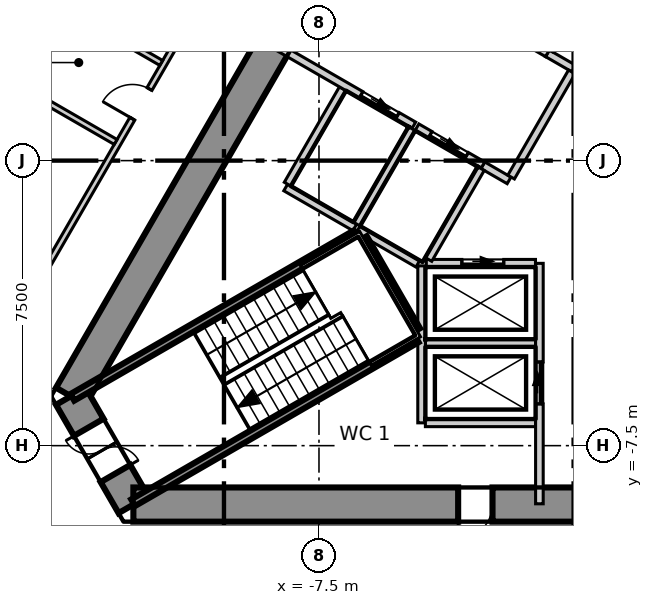
"""IFC4 building model, lengths in metres.
Left out: names, types, materials, properties, quantities, classifications, styles, units other than length and angle.
Written with IfcOpenShell. Run it as: python <this file> out.ifc"""

import sys

from ifc_helpers import new_model, si_unit, direction, frame, frame_2d, origin, place, context, subcontext, project, spatial, polyline, rectangle, outline, extrude, element, fill, save


model = new_model("IFC4")
c1 = context("Model", 3, precision=1e-05, world=origin(), true_north=direction((0.0, 1.0)))
c2 = subcontext(c1, "Body", "Model", "MODEL_VIEW")
j1 = project(units=[si_unit("LENGTHUNIT", "METRE"), si_unit("PLANEANGLEUNIT", "RADIAN")], contexts=[c1])
p1 = place(None, origin())
s1 = spatial("IfcSite", under=j1, at=p1, CompositionType="ELEMENT")
p2 = place(p1, origin())
s2 = spatial("IfcBuilding", under=s1, at=p2, CompositionType="ELEMENT")
p3 = place(p2, frame((0.0, 0.0, 71.3)))
s3 = spatial("IfcBuildingStorey", under=s2, at=p3, CompositionType="ELEMENT", Elevation=71.3)
p4 = place(p3, frame((-1.645, 15.25, -0.3), z_axis=(0.0, 0.0, 1.0), x_axis=(-0.500026485275, -0.866010111964, 0.0)))
e1 = element("IfcWall", 1, at=p4, inside=s3, PredefinedType="SHEAR", context=c2, shape_type="SweptSolid", body=[
    extrude(outline(polyline([(-0.26, -0.45), (1.685, -0.45), (3.63, -0.45), (5.576, -0.45), (7.521, -0.45), (9.466, -0.449), (11.411, -0.449), (13.357, -0.449), (15.302, -0.449), (17.247, -0.449), (19.192, -0.449), (21.138, -0.449), (23.083, -0.449), (25.028, -0.449), (24.509, 0.45), (22.644, 0.45), (20.778, 0.45), (18.913, 0.45), (17.048, 0.45), (15.182, 0.449), (13.317, 0.449), (11.452, 0.449), (9.587, 0.449), (7.721, 0.449), (5.856, 0.449), (3.991, 0.449), (2.125, 0.449), (0.26, 0.449), (-0.26, -0.45)])), origin(), (0.0, 0.0, 1.0), 4.0),
])
p5 = place(p4, frame((11.834, 0.0, 0.3)))
e2 = element("IfcOpeningElement", 2, at=p5, cuts=e1, PredefinedType="OPENING", context=c2, shape_type="SweptSolid", body=[
    extrude(rectangle(XDim=1.1, YDim=2.1, at=frame_2d((0.55, 1.05))), frame((0.0, 0.46, 0.0), z_axis=(0.0, -1.0, 0.0), x_axis=(1.0, 0.0, 0.0)), (0.0, 0.0, 1.0), 0.92),
])
p6 = place(p4, frame((8.13, 0.0, 0.3)))
e3 = element("IfcOpeningElement", 3, at=p6, cuts=e1, PredefinedType="OPENING", context=c2, shape_type="SweptSolid", body=[
    extrude(rectangle(XDim=0.9, YDim=2.1, at=frame_2d((0.45, 1.05))), frame((0.0, 0.46, 0.0), z_axis=(0.0, -1.0, 0.0), x_axis=(1.0, 0.0, 0.0)), (0.0, 0.0, 1.0), 0.92),
])
p7 = place(p4, frame((3.255, 0.0, 0.3)))
e4 = element("IfcOpeningElement", 4, at=p7, cuts=e1, PredefinedType="OPENING", context=c2, shape_type="SweptSolid", body=[
    extrude(rectangle(XDim=0.9, YDim=2.1, at=frame_2d((0.45, 1.05))), frame((0.0, 0.46, 0.0), z_axis=(0.0, -1.0, 0.0), x_axis=(1.0, 0.0, 0.0)), (0.0, 0.0, 1.0), 0.92),
])
p8 = place(p3, frame((-14.03, -6.2, -0.3), z_axis=(0.0, 0.0, 1.0), x_axis=(0.500111984565, -0.865960739811, 0.0)))
e5 = element("IfcWall", 5, at=p8, inside=s3, PredefinedType="SHEAR", context=c2, shape_type="SweptSolid", body=[
    extrude(outline(polyline([(-0.26, -0.449), (1.646, -0.449), (3.551, -0.45), (3.032, 0.45), (1.646, 0.45), (0.26, 0.45), (-0.26, -0.449)])), origin(), (0.0, 0.0, 1.0), 4.0),
])
p9 = place(p8, frame((0.946, 0.0, 0.3)))
e6 = element("IfcOpeningElement", 6, at=p9, cuts=e5, PredefinedType="OPENING", context=c2, shape_type="SweptSolid", body=[
    extrude(rectangle(XDim=1.4, YDim=2.1, at=frame_2d((0.7, 1.05))), frame((0.0, 0.46, 0.0), z_axis=(0.0, -1.0, 0.0), x_axis=(1.0, 0.0, 0.0)), (0.0, 0.0, 1.0), 0.92),
])
p10 = place(p3, frame((-12.384, -9.05, -0.3), z_axis=(0.0, 0.0, 1.0), x_axis=(1.0, 0.0, 0.0)))
e7 = element("IfcWall", 7, at=p10, inside=s3, PredefinedType="SHEAR", context=c2, shape_type="SweptSolid", body=[
    extrude(outline(polyline([(-0.26, -0.45), (1.685, -0.45), (3.63, -0.45), (5.576, -0.45), (7.521, -0.45), (9.466, -0.45), (11.411, -0.45), (13.357, -0.45), (15.302, -0.45), (17.247, -0.45), (19.192, -0.45), (21.138, -0.45), (23.083, -0.45), (25.028, -0.45), (24.508, 0.45), (22.643, 0.45), (20.778, 0.45), (18.912, 0.45), (17.047, 0.45), (15.182, 0.45), (13.317, 0.45), (11.451, 0.45), (9.586, 0.45), (7.721, 0.45), (5.856, 0.45), (3.99, 0.45), (2.125, 0.45), (0.26, 0.45), (-0.26, -0.45)])), origin(), (0.0, 0.0, 1.0), 4.0),
])
p11 = place(p10, frame((8.548, 0.0, 0.3)))
e8 = element("IfcOpeningElement", 8, at=p11, cuts=e7, PredefinedType="OPENING", context=c2, shape_type="SweptSolid", body=[
    extrude(rectangle(XDim=0.9, YDim=2.1, at=frame_2d((0.45, 1.05))), frame((0.0, 0.46, 0.0), z_axis=(0.0, -1.0, 0.0), x_axis=(1.0, 0.0, 0.0)), (0.0, 0.0, 1.0), 0.92),
])
p12 = place(p10, frame((19.788, 0.0, 0.3)))
e9 = element("IfcOpeningElement", 9, at=p12, cuts=e7, PredefinedType="OPENING", context=c2, shape_type="SweptSolid", body=[
    extrude(rectangle(XDim=1.0, YDim=2.1, at=frame_2d((0.5, 1.05))), frame((0.0, 0.46, 0.0), z_axis=(0.0, -1.0, 0.0), x_axis=(1.0, 0.0, 0.0)), (0.0, 0.0, 1.0), 0.92),
])
p13 = place(p3, frame((-3.326, 37.084, 0.0), z_axis=(0.0, 0.0, 1.0), x_axis=(-0.500000131003, -0.86602532815, 0.0)))
e10 = element("IfcWall", 10, at=p13, inside=s3, PredefinedType="ELEMENTEDWALL", context=c2, shape_type="SweptSolid", body=[
    extrude(rectangle(XDim=60.886, YDim=0.2, at=frame_2d((30.443, 0.0))), origin(), (0.0, 0.0, 1.0), 3.7),
])
p14 = place(p13, frame((2.146, 0.0, 0.9)))
e11 = element("IfcOpeningElement", 11, at=p14, cuts=e10, PredefinedType="OPENING", context=c2, shape_type="SweptSolid", body=[
    extrude(rectangle(XDim=5.6, YDim=2.5, at=frame_2d((2.8, 1.25))), frame((0.0, 0.11, 0.0), z_axis=(0.0, -1.0, 0.0), x_axis=(1.0, 0.0, 0.0)), (0.0, 0.0, 1.0), 0.22),
])
p15 = place(p13, frame((9.434, 0.0, 0.9)))
e12 = element("IfcOpeningElement", 12, at=p15, cuts=e10, PredefinedType="OPENING", context=c2, shape_type="SweptSolid", body=[
    extrude(rectangle(XDim=5.6, YDim=2.5, at=frame_2d((2.8, 1.25))), frame((0.0, 0.11, 0.0), z_axis=(0.0, -1.0, 0.0), x_axis=(1.0, 0.0, 0.0)), (0.0, 0.0, 1.0), 0.22),
])
p16 = place(p13, frame((16.721, 0.0, 0.9)))
e13 = element("IfcOpeningElement", 13, at=p16, cuts=e10, PredefinedType="OPENING", context=c2, shape_type="SweptSolid", body=[
    extrude(rectangle(XDim=5.6, YDim=2.5, at=frame_2d((2.8, 1.25))), frame((0.0, 0.11, 0.0), z_axis=(0.0, -1.0, 0.0), x_axis=(1.0, 0.0, 0.0)), (0.0, 0.0, 1.0), 0.22),
])
p17 = place(p13, frame((24.009, 0.0, 0.9)))
e14 = element("IfcOpeningElement", 14, at=p17, cuts=e10, PredefinedType="OPENING", context=c2, shape_type="SweptSolid", body=[
    extrude(rectangle(XDim=5.6, YDim=2.5, at=frame_2d((2.8, 1.25))), frame((0.0, 0.11, 0.0), z_axis=(0.0, -1.0, 0.0), x_axis=(1.0, 0.0, 0.0)), (0.0, 0.0, 1.0), 0.22),
])
p18 = place(p13, frame((31.297, 0.0, 0.9)))
e15 = element("IfcOpeningElement", 15, at=p18, cuts=e10, PredefinedType="OPENING", context=c2, shape_type="SweptSolid", body=[
    extrude(rectangle(XDim=5.6, YDim=2.5, at=frame_2d((2.8, 1.25))), frame((0.0, 0.11, 0.0), z_axis=(0.0, -1.0, 0.0), x_axis=(1.0, 0.0, 0.0)), (0.0, 0.0, 1.0), 0.22),
])
p19 = place(p13, frame((38.584, 0.0, 0.9)))
e16 = element("IfcOpeningElement", 16, at=p19, cuts=e10, PredefinedType="OPENING", context=c2, shape_type="SweptSolid", body=[
    extrude(rectangle(XDim=5.6, YDim=2.5, at=frame_2d((2.8, 1.25))), frame((0.0, 0.11, 0.0), z_axis=(0.0, -1.0, 0.0), x_axis=(1.0, 0.0, 0.0)), (0.0, 0.0, 1.0), 0.22),
])
p20 = place(p13, frame((45.872, 0.0, 0.9)))
e17 = element("IfcOpeningElement", 17, at=p20, cuts=e10, PredefinedType="OPENING", context=c2, shape_type="SweptSolid", body=[
    extrude(rectangle(XDim=5.6, YDim=2.5, at=frame_2d((2.8, 1.25))), frame((0.0, 0.11, 0.0), z_axis=(0.0, -1.0, 0.0), x_axis=(1.0, 0.0, 0.0)), (0.0, 0.0, 1.0), 0.22),
])
p21 = place(p13, frame((53.159, 0.0, 0.9)))
e18 = element("IfcOpeningElement", 18, at=p21, cuts=e10, PredefinedType="OPENING", context=c2, shape_type="SweptSolid", body=[
    extrude(rectangle(XDim=5.6, YDim=2.5, at=frame_2d((2.8, 1.25))), frame((0.0, 0.11, 0.0), z_axis=(0.0, -1.0, 0.0), x_axis=(1.0, 0.0, 0.0)), (0.0, 0.0, 1.0), 0.22),
])
p22 = place(p3, frame((-19.497, -11.17, 0.0), z_axis=(0.0, 0.0, 1.0), x_axis=(0.499998854553, 0.866026065108, 0.0)))
e19 = element("IfcWall", 19, at=p22, inside=s3, PredefinedType="PARTITIONING", context=c2, shape_type="SweptSolid", body=[
    extrude(rectangle(XDim=38.994, YDim=0.15, at=frame_2d((19.497, 0.0))), origin(), (0.0, 0.0, 1.0), 3.7),
])
p23 = place(p22, frame((35.944, 0.0, 0.0)))
e20 = element("IfcOpeningElement", 20, at=p23, cuts=e19, PredefinedType="OPENING", context=c2, shape_type="SweptSolid", body=[
    extrude(rectangle(XDim=1.1, YDim=2.1, at=frame_2d((0.55, 1.05))), frame((0.0, 0.085, 0.0), z_axis=(0.0, -1.0, 0.0), x_axis=(1.0, 0.0, 0.0)), (0.0, 0.0, 1.0), 0.17),
])
p24 = place(p22, frame((26.148, 0.0, 0.0)))
e21 = element("IfcOpeningElement", 21, at=p24, cuts=e19, PredefinedType="OPENING", context=c2, shape_type="SweptSolid", body=[
    extrude(rectangle(XDim=1.1, YDim=2.1, at=frame_2d((0.55, 1.05))), frame((0.0, 0.085, 0.0), z_axis=(0.0, -1.0, 0.0), x_axis=(1.0, 0.0, 0.0)), (0.0, 0.0, 1.0), 0.17),
])
p25 = place(p22, frame((8.572, 0.0, 0.0)))
e22 = element("IfcOpeningElement", 22, at=p25, cuts=e19, PredefinedType="OPENING", context=c2, shape_type="SweptSolid", body=[
    extrude(rectangle(XDim=1.1, YDim=2.1, at=frame_2d((0.55, 1.05))), frame((0.0, 0.085, 0.0), z_axis=(0.0, -1.0, 0.0), x_axis=(1.0, 0.0, 0.0)), (0.0, 0.0, 1.0), 0.17),
])
p26 = place(p22, frame((17.172, 0.0, 0.0)))
e23 = element("IfcOpeningElement", 23, at=p26, cuts=e19, PredefinedType="OPENING", context=c2, shape_type="SweptSolid", body=[
    extrude(rectangle(XDim=0.9, YDim=2.1, at=frame_2d((0.45, 1.05))), frame((0.0, 0.085, 0.0), z_axis=(0.0, -1.0, 0.0), x_axis=(1.0, 0.0, 0.0)), (0.0, 0.0, 1.0), 0.17),
])
p27 = place(p22, frame((14.172, 0.0, 0.0)))
e24 = element("IfcOpeningElement", 24, at=p27, cuts=e19, PredefinedType="OPENING", context=c2, shape_type="SweptSolid", body=[
    extrude(rectangle(XDim=0.9, YDim=2.1, at=frame_2d((0.45, 1.05))), frame((0.0, 0.085, 0.0), z_axis=(0.0, -1.0, 0.0), x_axis=(1.0, 0.0, 0.0)), (0.0, 0.0, 1.0), 0.17),
])
p28 = place(p22, frame((1.797, 0.0, 0.0)))
e25 = element("IfcOpeningElement", 25, at=p28, cuts=e19, PredefinedType="OPENING", context=c2, shape_type="SweptSolid", body=[
    extrude(rectangle(XDim=1.1, YDim=2.1, at=frame_2d((0.55, 1.05))), frame((0.0, 0.085, 0.0), z_axis=(0.0, -1.0, 0.0), x_axis=(1.0, 0.0, 0.0)), (0.0, 0.0, 1.0), 0.17),
])
p29 = place(p3, frame((-14.812, 4.395, 0.0), z_axis=(0.0, 0.0, 1.0), x_axis=(0.866040790738, -0.499973348067, 0.0)))
e26 = element("IfcWall", 26, at=p29, inside=s3, PredefinedType="PARTITIONING", context=c2, shape_type="SweptSolid", body=[
    extrude(rectangle(XDim=3.65, YDim=0.15, at=frame_2d((1.825, 0.0))), origin(), (0.0, 0.0, 1.0), 3.7),
])
p30 = place(p3, frame((-15.384, 1.954, 0.0), z_axis=(0.0, 0.0, 1.0), x_axis=(0.499980071345, 0.866036909293, 0.0)))
e27 = element("IfcWall", 27, at=p30, inside=s3, PredefinedType="PARTITIONING", context=c2, shape_type="SweptSolid", body=[
    extrude(rectangle(XDim=2.324, YDim=0.15, at=frame_2d((1.162, 0.0))), origin(), (0.0, 0.0, 1.0), 3.7),
])
p31 = place(p3, frame((-15.319, 1.916, 0.0), z_axis=(0.0, 0.0, 1.0), x_axis=(0.866004402611, -0.500036373335, 0.0)))
e28 = element("IfcWall", 28, at=p31, inside=s3, PredefinedType="PARTITIONING", context=c2, shape_type="SweptSolid", body=[
    extrude(rectangle(XDim=2.85, YDim=0.15, at=frame_2d((1.425, 0.0))), origin(), (0.0, 0.0, 1.0), 3.7),
])
p32 = place(p3, frame((-8.376, -0.707, 0.0), z_axis=(0.0, 0.0, 1.0), x_axis=(0.866067520717, -0.499927044236, 0.0)))
e29 = element("IfcWall", 29, at=p32, inside=s3, PredefinedType="SOLIDWALL", context=c2, shape_type="SweptSolid", body=[
    extrude(rectangle(XDim=2.1, YDim=0.2, at=frame_2d((1.05, 0.0))), origin(), (0.0, 0.0, 1.0), 3.7),
])
p33 = place(p3, frame((-8.326, -0.62, 0.0), z_axis=(0.0, 0.0, 1.0), x_axis=(0.500023687443, 0.866011727401, 0.0)))
e30 = element("IfcWall", 30, at=p33, inside=s3, PredefinedType="SOLIDWALL", context=c2, shape_type="SweptSolid", body=[
    extrude(rectangle(XDim=2.9, YDim=0.2, at=frame_2d((1.45, 0.0))), origin(), (0.0, 0.0, 1.0), 3.7),
])
p34 = place(p3, frame((-4.7, -4.8, 0.0), z_axis=(0.0, 0.0, 1.0), x_axis=(1.0, 0.0, 0.0)))
e31 = element("IfcWall", 31, at=p34, inside=s3, PredefinedType="SOLIDWALL", context=c2, shape_type="SweptSolid", body=[
    extrude(rectangle(XDim=2.9, YDim=0.2, at=frame_2d((1.45, 0.0))), origin(), (0.0, 0.0, 1.0), 3.7),
])
p35 = place(p3, frame((-4.8, -6.9, 0.0), z_axis=(0.0, 0.0, 1.0), x_axis=(0.0, 1.0, 0.0)))
e32 = element("IfcWall", 32, at=p35, inside=s3, PredefinedType="SOLIDWALL", context=c2, shape_type="SweptSolid", body=[
    extrude(rectangle(XDim=4.131, YDim=0.2, at=frame_2d((2.065, 0.0))), origin(), (0.0, 0.0, 1.0), 3.7),
])
p36 = place(p3, frame((-4.7, -6.9, 0.0), z_axis=(0.0, 0.0, 1.0), x_axis=(1.0, 0.0, 0.0)))
e33 = element("IfcWall", 33, at=p36, inside=s3, PredefinedType="SOLIDWALL", context=c2, shape_type="SweptSolid", body=[
    extrude(rectangle(XDim=2.9, YDim=0.2, at=frame_2d((1.45, 0.0))), origin(), (0.0, 0.0, 1.0), 3.7),
])
p37 = place(p3, frame((-1.7, -9.03, 0.0), z_axis=(0.0, 0.0, 1.0), x_axis=(0.0, 1.0, 0.0)))
e34 = element("IfcWall", 34, at=p37, inside=s3, PredefinedType="SOLIDWALL", context=c2, shape_type="SweptSolid", body=[
    extrude(rectangle(XDim=6.327, YDim=0.2, at=frame_2d((3.164, 0.0))), origin(), (0.0, 0.0, 1.0), 3.7),
])
p38 = place(p37, frame((2.63, 0.0, 0.0)))
e35 = element("IfcOpeningElement", 35, at=p38, cuts=e34, PredefinedType="OPENING", context=c2, shape_type="SweptSolid", body=[
    extrude(rectangle(XDim=1.1, YDim=2.1, at=frame_2d((0.55, 1.05))), frame((0.0, 0.11, 0.0), z_axis=(0.0, -1.0, 0.0), x_axis=(1.0, 0.0, 0.0)), (0.0, 0.0, 1.0), 0.22),
])
p39 = place(p3, frame((-4.676, -2.7, 0.0), z_axis=(0.0, 0.0, 1.0), x_axis=(1.0, 0.0, 0.0)))
e36 = element("IfcWall", 36, at=p39, inside=s3, PredefinedType="SOLIDWALL", context=c2, shape_type="SweptSolid", body=[
    extrude(rectangle(XDim=2.873, YDim=0.2, at=frame_2d((1.437, 0.0))), origin(), (0.0, 0.0, 1.0), 3.7),
])
p40 = place(p39, frame((0.937, 0.0, 0.0)))
e37 = element("IfcOpeningElement", 37, at=p40, cuts=e36, PredefinedType="OPENING", context=c2, shape_type="SweptSolid", body=[
    extrude(rectangle(XDim=1.1, YDim=2.1, at=frame_2d((0.55, 1.05))), frame((0.0, 0.11, 0.0), z_axis=(0.0, -1.0, 0.0), x_axis=(1.0, 0.0, 0.0)), (0.0, 0.0, 1.0), 0.22),
])
p41 = place(p3, frame((-8.67, 3.043, 0.0), z_axis=(0.0, 0.0, 1.0), x_axis=(0.866029956157, -0.499992114976, 0.0)))
e38 = element("IfcWall", 38, at=p41, inside=s3, PredefinedType="SOLIDWALL", context=c2, shape_type="SweptSolid", body=[
    extrude(rectangle(XDim=4.232, YDim=0.2, at=frame_2d((2.116, 0.0))), origin(), (0.0, 0.0, 1.0), 3.7),
])
p42 = place(p41, frame((2.63, 0.0, 0.0)))
e39 = element("IfcOpeningElement", 39, at=p42, cuts=e38, PredefinedType="OPENING", context=c2, shape_type="SweptSolid", body=[
    extrude(rectangle(XDim=1.1, YDim=2.1, at=frame_2d((0.55, 1.05))), frame((0.0, 0.11, 0.0), z_axis=(0.0, -1.0, 0.0), x_axis=(1.0, 0.0, 0.0)), (0.0, 0.0, 1.0), 0.22),
])
p43 = place(p3, frame((-3.188, -0.122, 0.0), z_axis=(0.0, 0.0, 1.0), x_axis=(0.865705793592, -0.50055317294, 0.0)))
e40 = element("IfcWall", 40, at=p43, inside=s3, PredefinedType="SOLIDWALL", context=c2, shape_type="SweptSolid", body=[
    extrude(rectangle(XDim=0.797, YDim=0.2, at=frame_2d((0.398, 0.0))), origin(), (0.0, 0.0, 1.0), 3.7),
])
p44 = place(p3, frame((-1.488, 2.822, 0.0), z_axis=(0.0, 0.0, 1.0), x_axis=(0.866236612152, -0.499633997809, 0.0)))
e41 = element("IfcWall", 41, at=p44, inside=s3, PredefinedType="SOLIDWALL", context=c2, shape_type="SweptSolid", body=[
    extrude(rectangle(XDim=0.796, YDim=0.2, at=frame_2d((0.398, 0.0))), origin(), (0.0, 0.0, 1.0), 3.7),
])
p45 = place(p3, frame((-2.444, -0.433, 0.0), z_axis=(0.0, 0.0, 1.0), x_axis=(0.500035624827, 0.866004834804, 0.0)))
e42 = element("IfcWall", 42, at=p45, inside=s3, PredefinedType="SOLIDWALL", context=c2, shape_type="SweptSolid", body=[
    extrude(rectangle(XDim=3.194, YDim=0.2, at=frame_2d((1.597, 0.0))), origin(), (0.0, 0.0, 1.0), 3.7),
])
p46 = place(p3, frame((-6.507, -1.67, 0.0), z_axis=(0.0, 0.0, 1.0), x_axis=(0.50012328804, 0.865954211699, 0.0)))
e43 = element("IfcWall", 43, at=p46, inside=s3, PredefinedType="SOLIDWALL", context=c2, shape_type="SweptSolid", body=[
    extrude(rectangle(XDim=2.9, YDim=0.2, at=frame_2d((1.45, 0.0))), origin(), (0.0, 0.0, 1.0), 3.7),
])
p47 = place(p3, frame((-6.47, -1.807, 0.0), z_axis=(0.0, 0.0, 1.0), x_axis=(0.865883195159, -0.500246231712, 0.0)))
e44 = element("IfcWall", 44, at=p47, inside=s3, PredefinedType="SOLIDWALL", context=c2, shape_type="SweptSolid", body=[
    extrude(rectangle(XDim=1.815, YDim=0.2, at=frame_2d((0.908, 0.0))), origin(), (0.0, 0.0, 1.0), 3.7),
])
p48 = place(p3, frame((-4.922, 0.879, 0.0), z_axis=(0.0, 0.0, 1.0), x_axis=(0.866073918653, -0.499915960366, 0.0)))
e45 = element("IfcWall", 45, at=p48, inside=s3, PredefinedType="SOLIDWALL", context=c2, shape_type="SweptSolid", body=[
    extrude(rectangle(XDim=2.002, YDim=0.2, at=frame_2d((1.001, 0.0))), origin(), (0.0, 0.0, 1.0), 3.7),
])
p49 = place(p48, frame((0.402, 0.0, 0.0)))
e46 = element("IfcOpeningElement", 46, at=p49, cuts=e45, PredefinedType="OPENING", context=c2, shape_type="SweptSolid", body=[
    extrude(rectangle(XDim=1.1, YDim=2.1, at=frame_2d((0.55, 1.05))), frame((0.0, 0.11, 0.0), z_axis=(0.0, -1.0, 0.0), x_axis=(1.0, 0.0, 0.0)), (0.0, 0.0, 1.0), 0.22),
])
p50 = place(p3, frame((-4.619, -2.6, 0.0), z_axis=(0.0, 0.0, 1.0), x_axis=(0.50009492287, 0.865970593103, 0.0)))
e47 = element("IfcWall", 47, at=p50, inside=s3, PredefinedType="SOLIDWALL", context=c2, shape_type="SweptSolid", body=[
    extrude(rectangle(XDim=2.761, YDim=0.2, at=frame_2d((1.381, 0.0))), origin(), (0.0, 0.0, 1.0), 3.7),
])
p51 = place(p3, frame((-3.309, 3.873, 0.0), z_axis=(0.0, 0.0, 1.0), x_axis=(0.866098583652, -0.499873227325, 0.0)))
e48 = element("IfcWall", 48, at=p51, inside=s3, PredefinedType="SOLIDWALL", context=c2, shape_type="SweptSolid", body=[
    extrude(rectangle(XDim=2.103, YDim=0.2, at=frame_2d((1.051, 0.0))), origin(), (0.0, 0.0, 1.0), 3.7),
])
p52 = place(p51, frame((0.502, 0.0, 0.0)))
e49 = element("IfcOpeningElement", 49, at=p52, cuts=e48, PredefinedType="OPENING", context=c2, shape_type="SweptSolid", body=[
    extrude(rectangle(XDim=1.1, YDim=2.1, at=frame_2d((0.55, 1.05))), frame((0.0, 0.11, 0.0), z_axis=(0.0, -1.0, 0.0), x_axis=(1.0, 0.0, 0.0)), (0.0, 0.0, 1.0), 0.22),
])
p53 = place(p3, frame((-13.99, -6.229, 0.0), z_axis=(0.0, 0.0, 1.0), x_axis=(0.866060059011, 0.499939970583, 0.0)))
e50 = element("IfcWall", 50, at=p53, inside=s3, PredefinedType="SOLIDWALL", context=c2, shape_type="SweptSolid", body=[
    extrude(rectangle(XDim=8.615, YDim=0.2, at=frame_2d((4.307, 0.0))), origin(), (0.0, 0.0, 1.0), 3.7),
])
p54 = place(p3, frame((-6.329, -2.038, 0.0), z_axis=(0.0, 0.0, 1.0), x_axis=(0.500200581029, -0.865909567298, 0.0)))
e51 = element("IfcWall", 51, at=p54, inside=s3, PredefinedType="SOLIDWALL", context=c2, shape_type="SweptSolid", body=[
    extrude(rectangle(XDim=2.799, YDim=0.2, at=frame_2d((1.399, 0.0))), origin(), (0.0, 0.0, 1.0), 3.7),
])
p55 = place(p3, frame((-12.39, -9.001, 0.0), z_axis=(0.0, 0.0, 1.0), x_axis=(0.866010975815, 0.500024989144, 0.0)))
e52 = element("IfcWall", 52, at=p55, inside=s3, PredefinedType="SOLIDWALL", context=c2, shape_type="SweptSolid", body=[
    extrude(rectangle(XDim=8.615, YDim=0.2, at=frame_2d((4.308, 0.0))), origin(), (0.0, 0.0, 1.0), 3.7),
])
p56 = place(p40, origin())
e53 = element("IfcDoor", 53, at=p56, inside=s3, OperationType="SLIDING_TO_LEFT", PredefinedType="DOOR", context=c2, shape_type="SweptSolid", body=[
    extrude(rectangle(XDim=1.1, YDim=2.1, at=frame_2d((0.55, 1.05))), frame((0.0, 0.025, 0.0), z_axis=(0.0, -1.0, 0.0), x_axis=(1.0, 0.0, 0.0)), (0.0, 0.0, 1.0), 0.05),
])
fill(e37, e53)
p57 = place(p38, origin())
e54 = element("IfcDoor", 54, at=p57, inside=s3, OperationType="SLIDING_TO_LEFT", PredefinedType="DOOR", context=c2, shape_type="SweptSolid", body=[
    extrude(rectangle(XDim=1.1, YDim=2.1, at=frame_2d((0.55, 1.05))), frame((0.0, 0.025, 0.0), z_axis=(0.0, -1.0, 0.0), x_axis=(1.0, 0.0, 0.0)), (0.0, 0.0, 1.0), 0.05),
])
fill(e35, e54)
p58 = place(p49, origin())
e55 = element("IfcDoor", 55, at=p58, inside=s3, OperationType="SLIDING_TO_LEFT", PredefinedType="DOOR", context=c2, shape_type="SweptSolid", body=[
    extrude(rectangle(XDim=1.1, YDim=2.1, at=frame_2d((0.55, 1.05))), frame((0.0, 0.025, 0.0), z_axis=(0.0, -1.0, 0.0), x_axis=(1.0, 0.0, 0.0)), (0.0, 0.0, 1.0), 0.05),
])
fill(e46, e55)
p59 = place(p42, origin())
e56 = element("IfcDoor", 56, at=p59, inside=s3, OperationType="SLIDING_TO_LEFT", PredefinedType="DOOR", context=c2, shape_type="SweptSolid", body=[
    extrude(rectangle(XDim=1.1, YDim=2.1, at=frame_2d((0.55, 1.05))), frame((0.0, 0.025, 0.0), z_axis=(0.0, -1.0, 0.0), x_axis=(1.0, 0.0, 0.0)), (0.0, 0.0, 1.0), 0.05),
])
fill(e39, e56)
p60 = place(p27, origin())
e57 = element("IfcDoor", 57, at=p60, inside=s3, OperationType="SINGLE_SWING_RIGHT", PredefinedType="DOOR", context=c2, shape_type="SweptSolid", body=[
    extrude(rectangle(XDim=0.9, YDim=2.1, at=frame_2d((0.45, 1.05))), frame((0.0, 0.025, 0.0), z_axis=(0.0, -1.0, 0.0), x_axis=(1.0, 0.0, 0.0)), (0.0, 0.0, 1.0), 0.05),
])
fill(e24, e57)
p61 = place(p9, origin())
e58 = element("IfcDoor", 58, at=p61, inside=s3, OperationType="DOUBLE_DOOR_SINGLE_SWING", PredefinedType="DOOR", context=c2, shape_type="SweptSolid", body=[
    extrude(rectangle(XDim=1.4, YDim=2.1, at=frame_2d((0.7, 1.05))), frame((0.0, 0.025, 0.0), z_axis=(0.0, -1.0, 0.0), x_axis=(1.0, 0.0, 0.0)), (0.0, 0.0, 1.0), 0.05),
])
fill(e6, e58)
p62 = place(p11, origin())
e59 = element("IfcDoor", 59, at=p62, inside=s3, OperationType="SINGLE_SWING_LEFT", PredefinedType="DOOR", context=c2, shape_type="SweptSolid", body=[
    extrude(rectangle(XDim=0.9, YDim=2.1, at=frame_2d((0.45, 1.05))), frame((0.0, 0.175, 0.0), z_axis=(0.0, -1.0, 0.0), x_axis=(1.0, 0.0, 0.0)), (0.0, 0.0, 1.0), 0.05),
])
fill(e8, e59)
save(model, sys.argv[1])
